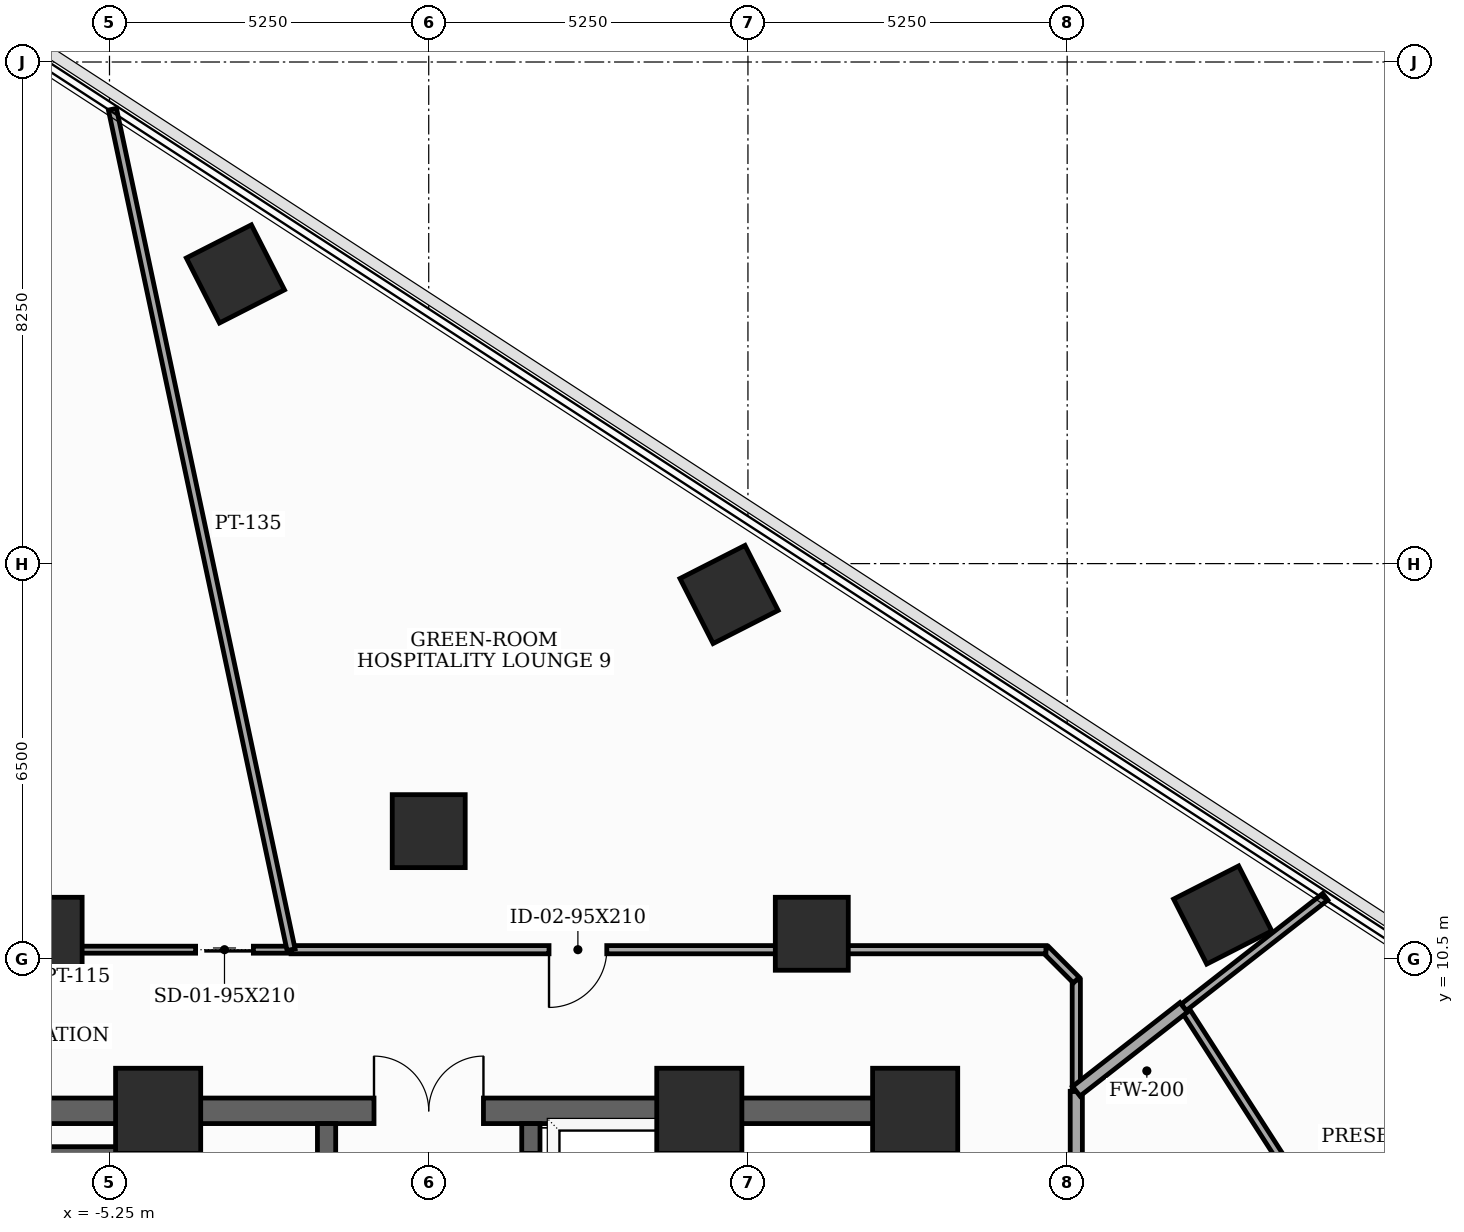
"""IFC4 building model, lengths in metres.
Left out: names, types, materials, properties, quantities, classifications, styles, units other than length and angle.
Written with IfcOpenShell. Run it as: python <this file> out.ifc"""

import sys

from ifc_helpers import new_model, si_unit, direction, frame, frame_2d, origin, origin_2d, place, context, subcontext, project, spatial, rectangle, extrude, element, fill, save


model = new_model("IFC4")
c1 = context("Model", 3, precision=1e-05, world=origin(), true_north=direction((0.0, 1.0)))
c2 = subcontext(c1, "Body", "Model", "MODEL_VIEW")
j1 = project(units=[si_unit("LENGTHUNIT", "METRE"), si_unit("PLANEANGLEUNIT", "RADIAN")], contexts=[c1])
p1 = place(None, origin())
s1 = spatial("IfcSite", under=j1, at=p1, CompositionType="ELEMENT")
p2 = place(p1, origin())
s2 = spatial("IfcBuilding", under=s1, at=p2, CompositionType="ELEMENT")
p3 = place(p2, frame((0.0, 0.0, 123.6)))
s3 = spatial("IfcBuildingStorey", under=s2, at=p3, CompositionType="ELEMENT", Elevation=123.6)
for number, where, z_axis, x_axis in (
    (1, (8.0, 8.0, 0.0), (0.0, 0.0, 1.0), (1.0, 0.0, 0.0)),
    (2, (4.45, 8.0, 0.0), (0.0, 0.0, 1.0), (1.0, 0.0, 0.0)),
    (3, (-4.45, 8.0, 0.0), (0.0, 0.0, 1.0), (1.0, 0.0, 0.0)),
):
    element("IfcColumn", number, at=place(p3, frame(where, z_axis=z_axis, x_axis=x_axis)), inside=s3, PredefinedType="COLUMN", context=c2, shape_type="SweptSolid", body=[
        extrude(rectangle(XDim=1.4, YDim=1.4, at=origin_2d()), origin(), (0.0, 0.0, 1.0), 3.7),
    ])
for number, where, z_axis, x_axis in (
    (4, (6.3, 10.912, 0.0), (0.0, 0.0, 1.0), (1.0, 0.0, 0.0)),
    (5, (0.0, 12.6, 0.0), (0.0, 0.0, 1.0), (1.0, 0.0, 0.0)),
    (6, (-6.3, 10.912, 0.0), (0.0, 0.0, 1.0), (1.0, 0.0, 0.0)),
    (7, (13.058, 11.22, 0.0), (0.0, 0.0, 1.0), (0.891, 0.454, 0.0)),
    (8, (4.939, 16.492, 0.0), (0.0, 0.0, 1.0), (0.891, 0.454, 0.0)),
    (9, (-3.179, 21.765, 0.0), (0.0, 0.0, 1.0), (0.891, 0.454, 0.0)),
):
    element("IfcColumn", number, at=place(p3, frame(where, z_axis=z_axis, x_axis=x_axis)), inside=s3, PredefinedType="COLUMN", context=c2, shape_type="SweptSolid", body=[
        extrude(rectangle(XDim=1.2, YDim=1.2, at=origin_2d()), origin(), (0.0, 0.0, 1.0), 3.7),
    ])
p4 = place(p3, frame((8.0, -8.0, 0.0), z_axis=(0.0, 0.0, 1.0), x_axis=(0.0, 1.0, 0.0)))
e10 = element("IfcWall", 10, at=p4, inside=s3, PredefinedType="SHEAR", context=c2, shape_type="SweptSolid", body=[
    extrude(rectangle(XDim=16.0, YDim=0.42, at=frame_2d((8.0, 0.0))), origin(), (0.0, 0.0, 1.0), 3.5),
])
p5 = place(p4, frame((9.6, 0.0, 0.0)))
e11 = element("IfcOpeningElement", 11, at=p5, cuts=e10, PredefinedType="OPENING", context=c2, shape_type="SweptSolid", body=[
    extrude(rectangle(XDim=1.05, YDim=2.15, at=frame_2d((0.525, 1.075))), frame((0.0, 0.22, 0.0), z_axis=(0.0, -1.0, 0.0), x_axis=(1.0, 0.0, 0.0)), (0.0, 0.0, 1.0), 0.44),
])
p6 = place(p4, frame((14.229, 0.0, 0.0)))
e12 = element("IfcOpeningElement", 12, at=p6, cuts=e10, PredefinedType="OPENING", context=c2, shape_type="SweptSolid", body=[
    extrude(rectangle(XDim=0.85, YDim=2.02, at=frame_2d((0.425, 1.01))), frame((0.0, 0.22, 0.0), z_axis=(0.0, -1.0, 0.0), x_axis=(1.0, 0.0, 0.0)), (0.0, 0.0, 1.0), 0.44),
])
p7 = place(p3, frame((-8.0, 8.0, 0.0), z_axis=(0.0, 0.0, 1.0), x_axis=(1.0, 0.0, 0.0)))
e13 = element("IfcWall", 13, at=p7, inside=s3, PredefinedType="SHEAR", context=c2, shape_type="SweptSolid", body=[
    extrude(rectangle(XDim=16.0, YDim=0.42, at=frame_2d((8.0, 0.0))), origin(), (0.0, 0.0, 1.0), 3.5),
])
p8 = place(p7, frame((7.1, 0.0, 0.0)))
e14 = element("IfcOpeningElement", 14, at=p8, cuts=e13, PredefinedType="OPENING", context=c2, shape_type="SweptSolid", body=[
    extrude(rectangle(XDim=1.8, YDim=2.15, at=frame_2d((0.9, 1.075))), frame((0.0, 0.22, 0.0), z_axis=(0.0, -1.0, 0.0), x_axis=(1.0, 0.0, 0.0)), (0.0, 0.0, 1.0), 0.44),
])
for number, where, z_axis, x_axis in (
    (15, (-4.45, -7.79, 0.0), (0.0, 0.0, 1.0), (0.0, 1.0, 0.0)),
    (16, (4.45, -7.79, 0.0), (0.0, 0.0, 1.0), (0.0, 1.0, 0.0)),
):
    element("IfcWall", number, at=place(p3, frame(where, z_axis=z_axis, x_axis=x_axis)), inside=s3, PredefinedType="SHEAR", context=c2, shape_type="SweptSolid", body=[
        extrude(rectangle(XDim=15.58, YDim=0.3, at=frame_2d((7.79, 0.0))), origin(), (0.0, 0.0, 1.0), 3.5),
    ])
p9 = place(p3, frame((-7.79, 7.26, 0.0), z_axis=(0.0, 0.0, 1.0), x_axis=(1.0, 0.0, 0.0)))
e17 = element("IfcWall", 17, at=p9, inside=s3, PredefinedType="SHEAR", context=c2, shape_type="SweptSolid", body=[
    extrude(rectangle(XDim=3.34, YDim=0.3, at=frame_2d((1.67, 0.0))), origin(), (0.0, 0.0, 1.0), 3.5),
])
p10 = place(p3, frame((-1.68, -4.85, 0.0), z_axis=(0.0, 0.0, 1.0), x_axis=(0.0, 1.0, 0.0)))
e18 = element("IfcWall", 18, at=p10, inside=s3, PredefinedType="SHEAR", context=c2, shape_type="SweptSolid", body=[
    extrude(rectangle(XDim=12.64, YDim=0.3, at=frame_2d((6.32, 0.0))), origin(), (0.0, 0.0, 1.0), 3.5),
])
p11 = place(p10, frame((2.6, 0.0, 0.0)))
e19 = element("IfcOpeningElement", 19, at=p11, cuts=e18, PredefinedType="OPENING", context=c2, shape_type="SweptSolid", body=[
    extrude(rectangle(XDim=0.95, YDim=2.1, at=frame_2d((0.475, 1.05))), frame((0.0, 0.16, 0.0), z_axis=(0.0, -1.0, 0.0), x_axis=(1.0, 0.0, 0.0)), (0.0, 0.0, 1.0), 0.32),
])
p12 = place(p10, frame((8.8, 0.0, 0.0)))
e20 = element("IfcOpeningElement", 20, at=p12, cuts=e18, PredefinedType="OPENING", context=c2, shape_type="SweptSolid", body=[
    extrude(rectangle(XDim=0.95, YDim=2.1, at=frame_2d((0.475, 1.05))), frame((0.0, 0.16, 0.0), z_axis=(0.0, -1.0, 0.0), x_axis=(1.0, 0.0, 0.0)), (0.0, 0.0, 1.0), 0.32),
])
p13 = place(p3, frame((1.68, -4.85, 0.0), z_axis=(0.0, 0.0, 1.0), x_axis=(0.0, 1.0, 0.0)))
e21 = element("IfcWall", 21, at=p13, inside=s3, PredefinedType="SHEAR", context=c2, shape_type="SweptSolid", body=[
    extrude(rectangle(XDim=12.64, YDim=0.3, at=frame_2d((6.32, 0.0))), origin(), (0.0, 0.0, 1.0), 3.5),
])
p14 = place(p13, frame((0.55, 0.0, 0.0)))
e22 = element("IfcOpeningElement", 22, at=p14, cuts=e21, PredefinedType="OPENING", context=c2, shape_type="SweptSolid", body=[
    extrude(rectangle(XDim=1.1, YDim=2.1, at=frame_2d((0.55, 1.05))), frame((0.0, 0.16, 0.0), z_axis=(0.0, -1.0, 0.0), x_axis=(1.0, 0.0, 0.0)), (0.0, 0.0, 1.0), 0.32),
])
p15 = place(p13, frame((2.65, 0.0, 0.0)))
e23 = element("IfcOpeningElement", 23, at=p15, cuts=e21, PredefinedType="OPENING", context=c2, shape_type="SweptSolid", body=[
    extrude(rectangle(XDim=1.1, YDim=2.1, at=frame_2d((0.55, 1.05))), frame((0.0, 0.16, 0.0), z_axis=(0.0, -1.0, 0.0), x_axis=(1.0, 0.0, 0.0)), (0.0, 0.0, 1.0), 0.32),
])
p16 = place(p13, frame((4.75, 0.0, 0.0)))
e24 = element("IfcOpeningElement", 24, at=p16, cuts=e21, PredefinedType="OPENING", context=c2, shape_type="SweptSolid", body=[
    extrude(rectangle(XDim=1.1, YDim=2.1, at=frame_2d((0.55, 1.05))), frame((0.0, 0.16, 0.0), z_axis=(0.0, -1.0, 0.0), x_axis=(1.0, 0.0, 0.0)), (0.0, 0.0, 1.0), 0.32),
])
p17 = place(p13, frame((6.85, 0.0, 0.0)))
e25 = element("IfcOpeningElement", 25, at=p17, cuts=e21, PredefinedType="OPENING", context=c2, shape_type="SweptSolid", body=[
    extrude(rectangle(XDim=1.1, YDim=2.1, at=frame_2d((0.55, 1.05))), frame((0.0, 0.16, 0.0), z_axis=(0.0, -1.0, 0.0), x_axis=(1.0, 0.0, 0.0)), (0.0, 0.0, 1.0), 0.32),
])
p18 = place(p13, frame((8.95, 0.0, 0.0)))
e26 = element("IfcOpeningElement", 26, at=p18, cuts=e21, PredefinedType="OPENING", context=c2, shape_type="SweptSolid", body=[
    extrude(rectangle(XDim=1.1, YDim=2.1, at=frame_2d((0.55, 1.05))), frame((0.0, 0.16, 0.0), z_axis=(0.0, -1.0, 0.0), x_axis=(1.0, 0.0, 0.0)), (0.0, 0.0, 1.0), 0.32),
])
p19 = place(p13, frame((11.05, 0.0, 0.0)))
e27 = element("IfcOpeningElement", 27, at=p19, cuts=e21, PredefinedType="OPENING", context=c2, shape_type="SweptSolid", body=[
    extrude(rectangle(XDim=1.1, YDim=2.1, at=frame_2d((0.55, 1.05))), frame((0.0, 0.16, 0.0), z_axis=(0.0, -1.0, 0.0), x_axis=(1.0, 0.0, 0.0)), (0.0, 0.0, 1.0), 0.32),
])
p20 = place(p3, frame((10.65, 2.655, 0.0), z_axis=(0.0, 0.0, 1.0), x_axis=(0.0, 1.0, 0.0)))
e28 = element("IfcWall", 28, at=p20, inside=s3, PredefinedType="SOLIDWALL", context=c2, shape_type="SweptSolid", body=[
    extrude(rectangle(XDim=5.666, YDim=0.2, at=frame_2d((2.833, 0.0))), origin(), (0.0, 0.0, 1.0), 2.785),
])
p21 = place(p20, frame((0.673, 0.0, 0.0)))
e29 = element("IfcOpeningElement", 29, at=p21, cuts=e28, PredefinedType="OPENING", context=c2, shape_type="SweptSolid", body=[
    extrude(rectangle(XDim=0.92, YDim=2.1, at=frame_2d((0.46, 1.05))), frame((0.0, 0.11, 0.0), z_axis=(0.0, -1.0, 0.0), x_axis=(1.0, 0.0, 0.0)), (0.0, 0.0, 1.0), 0.22),
])
p22 = place(p3, frame((10.65, 8.321, 0.0), z_axis=(0.0, 0.0, 1.0), x_axis=(0.0, 1.0, 0.0)))
e30 = element("IfcWall", 30, at=p22, inside=s3, PredefinedType="PARTITIONING", context=c2, shape_type="SweptSolid", body=[
    extrude(rectangle(XDim=1.829, YDim=0.135, at=frame_2d((0.915, 0.0))), origin(), (0.0, 0.0, 1.0), 3.125),
])
p23 = place(p3, frame((10.65, 10.15, 0.0), z_axis=(0.0, 0.0, 1.0), x_axis=(-0.707106781187, 0.707106781187, 0.0)))
e31 = element("IfcWall", 31, at=p23, inside=s3, PredefinedType="PARTITIONING", context=c2, shape_type="SweptSolid", body=[
    extrude(rectangle(XDim=0.707, YDim=0.135, at=frame_2d((0.354, 0.0))), origin(), (0.0, 0.0, 1.0), 3.125),
])
p24 = place(p3, frame((10.15, 10.65, 0.0), z_axis=(0.0, 0.0, 1.0), x_axis=(-1.0, 0.0, 0.0)))
e32 = element("IfcWall", 32, at=p24, inside=s3, PredefinedType="PARTITIONING", context=c2, shape_type="SweptSolid", body=[
    extrude(rectangle(XDim=12.414, YDim=0.135, at=frame_2d((6.207, 0.0))), origin(), (0.0, 0.0, 1.0), 2.785),
])
p25 = place(p24, frame((7.222, 0.0, 0.0)))
e33 = element("IfcOpeningElement", 33, at=p25, cuts=e32, PredefinedType="OPENING", context=c2, shape_type="SweptSolid", body=[
    extrude(rectangle(XDim=0.95, YDim=2.1, at=frame_2d((0.475, 1.05))), frame((0.0, 0.077, 0.0), z_axis=(0.0, -1.0, 0.0), x_axis=(1.0, 0.0, 0.0)), (0.0, 0.0, 1.0), 0.155),
])
p26 = place(p3, frame((-2.264, 10.65, 0.0), z_axis=(0.0, 0.0, 1.0), x_axis=(-1.0, 0.0, 0.0)))
e34 = element("IfcWall", 34, at=p26, inside=s3, PredefinedType="PARTITIONING", context=c2, shape_type="SweptSolid", body=[
    extrude(rectangle(XDim=5.474, YDim=0.115, at=frame_2d((2.737, 0.0))), origin(), (0.0, 0.0, 1.0), 2.785),
])
p27 = place(p26, frame((0.62, 0.0, 0.0)))
e35 = element("IfcOpeningElement", 35, at=p27, cuts=e34, PredefinedType="OPENING", context=c2, shape_type="SweptSolid", body=[
    extrude(rectangle(XDim=0.95, YDim=2.1, at=frame_2d((0.475, 1.05))), frame((0.0, 0.067, 0.0), z_axis=(0.0, -1.0, 0.0), x_axis=(1.0, 0.0, 0.0)), (0.0, 0.0, 1.0), 0.135),
])
p28 = place(p3, frame((12.416, 9.701, 0.0), z_axis=(0.0, 0.0, 1.0), x_axis=(0.540981963117, -0.841034194062, 0.0)))
e36 = element("IfcWall", 36, at=p28, inside=s3, PredefinedType="PARTITIONING", context=c2, shape_type="SweptSolid", body=[
    extrude(rectangle(XDim=3.299, YDim=0.135, at=frame_2d((1.65, 0.0))), origin(), (0.0, 0.0, 1.0), 2.885),
])
p29 = place(p3, frame((14.744, 11.52, 0.0), z_axis=(0.0, 0.0, 1.0), x_axis=(-0.788015604839, -0.615655265981, 0.0)))
e37 = element("IfcWall", 37, at=p29, inside=s3, PredefinedType="PARTITIONING", context=c2, shape_type="SweptSolid", body=[
    extrude(rectangle(XDim=2.955, YDim=0.135, at=frame_2d((1.478, 0.0))), origin(), (0.0, 0.0, 1.0), 2.885),
])
p30 = place(p3, frame((12.416, 9.701, 0.0), z_axis=(0.0, 0.0, 1.0), x_axis=(-0.788001252745, -0.615673635681, 0.0)))
e38 = element("IfcWall", 38, at=p30, inside=s3, PredefinedType="SOLIDWALL", context=c2, shape_type="SweptSolid", body=[
    extrude(rectangle(XDim=2.241, YDim=0.2, at=frame_2d((1.121, 0.0))), origin(), (0.0, 0.0, 1.0), 2.885),
])
p31 = place(p3, frame((-5.202, 24.473, 0.0), z_axis=(0.0, 0.0, 1.0), x_axis=(0.207879417489, -0.978154460085, 0.0)))
e39 = element("IfcWall", 39, at=p31, inside=s3, PredefinedType="PARTITIONING", context=c2, shape_type="SweptSolid", body=[
    extrude(rectangle(XDim=14.132, YDim=0.135, at=frame_2d((7.066, 0.0))), origin(), (0.0, 0.0, 1.0), 2.785),
])
p32 = place(p8, origin())
e40 = element("IfcDoor", 40, at=p32, inside=s3, OperationType="DOUBLE_DOOR_SINGLE_SWING", PredefinedType="DOOR", context=c2, shape_type="SweptSolid", body=[
    extrude(rectangle(XDim=1.8, YDim=2.15, at=frame_2d((0.9, 1.075))), frame((0.0, 0.025, 0.0), z_axis=(0.0, -1.0, 0.0), x_axis=(1.0, 0.0, 0.0)), (0.0, 0.0, 1.0), 0.05),
])
fill(e14, e40)
p33 = place(p25, origin())
e41 = element("IfcDoor", 41, at=p33, inside=s3, OperationType="SINGLE_SWING_RIGHT", PredefinedType="DOOR", context=c2, shape_type="SweptSolid", body=[
    extrude(rectangle(XDim=0.95, YDim=2.1, at=frame_2d((0.475, 1.05))), frame((0.0, 0.025, 0.0), z_axis=(0.0, -1.0, 0.0), x_axis=(1.0, 0.0, 0.0)), (0.0, 0.0, 1.0), 0.05),
])
fill(e33, e41)
p34 = place(p27, origin())
e42 = element("IfcDoor", 42, at=p34, inside=s3, OperationType="SLIDING_TO_LEFT", PredefinedType="DOOR", context=c2, shape_type="SweptSolid", body=[
    extrude(rectangle(XDim=0.95, YDim=2.1, at=frame_2d((0.475, 1.05))), frame((0.0, 0.025, 0.0), z_axis=(0.0, -1.0, 0.0), x_axis=(1.0, 0.0, 0.0)), (0.0, 0.0, 1.0), 0.05),
])
fill(e35, e42)
save(model, sys.argv[1])
